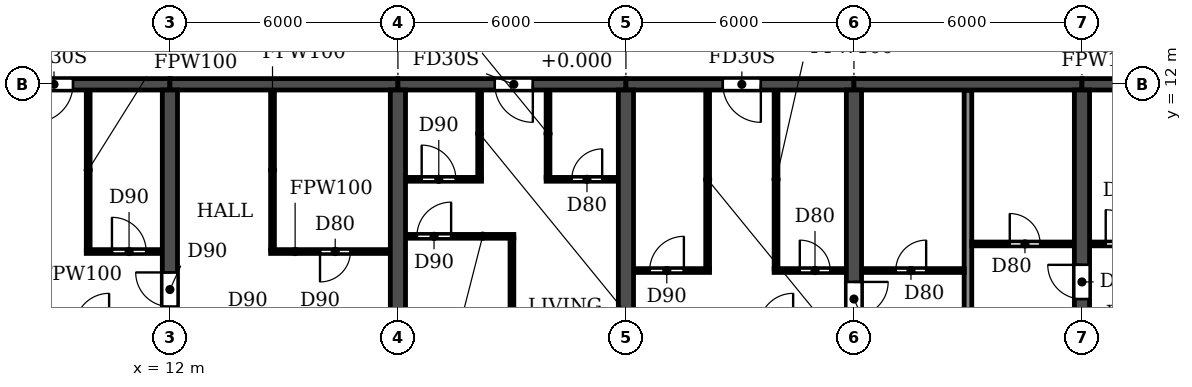
"""IFC4 building model, lengths in metres.
Left out: names, types, materials, properties, quantities, classifications, styles, units other than length and angle.
Written with IfcOpenShell. Run it as: python <this file> out.ifc"""

import sys

from ifc_helpers import new_model, si_unit, direction, frame, frame_2d, origin, place, context, subcontext, project, spatial, rectangle, extrude, element, fill, save


model = new_model("IFC4")
c1 = context("Model", 3, precision=1e-05, world=origin(), true_north=direction((0.0, 1.0)))
c2 = subcontext(c1, "Body", "Model", "MODEL_VIEW")
j1 = project(units=[si_unit("LENGTHUNIT", "METRE"), si_unit("PLANEANGLEUNIT", "RADIAN")], contexts=[c1])
p1 = place(None, origin())
s1 = spatial("IfcSite", under=j1, at=p1, CompositionType="ELEMENT")
p2 = place(p1, origin())
s2 = spatial("IfcBuilding", under=s1, at=p2, CompositionType="ELEMENT")
p3 = place(p2, frame((0.0, 0.0, 26.7)))
s3 = spatial("IfcBuildingStorey", under=s2, at=p3, CompositionType="ELEMENT", Elevation=26.7)
p4 = place(p3, frame((12.0, 0.2, 0.0), z_axis=(0.0, 0.0, 1.0), x_axis=(0.0, 1.0, 0.0)))
e1 = element("IfcWall", 1, at=p4, inside=s3, PredefinedType="SHEAR", context=c2, shape_type="SweptSolid", body=[
    extrude(rectangle(XDim=11.65, YDim=0.4, at=frame_2d((5.825, 0.0))), origin(), (0.0, 0.0, 1.0), 3.05),
])
p5 = place(p4, frame((5.95, 0.0, 0.0)))
e2 = element("IfcOpeningElement", 2, at=p5, cuts=e1, PredefinedType="OPENING", context=c2, shape_type="SweptSolid", body=[
    extrude(rectangle(XDim=0.9, YDim=2.1, at=frame_2d((0.45, 1.05))), frame((0.0, 0.21, 0.0), z_axis=(0.0, -1.0, 0.0), x_axis=(1.0, 0.0, 0.0)), (0.0, 0.0, 1.0), 0.42),
])
for number, where, z_axis, x_axis in (
    (3, (18.0, 0.2, 0.0), (0.0, 0.0, 1.0), (0.0, 1.0, 0.0)),
    (4, (24.0, 0.2, 0.0), (0.0, 0.0, 1.0), (0.0, 1.0, 0.0)),
):
    element("IfcWall", number, at=place(p3, frame(where, z_axis=z_axis, x_axis=x_axis)), inside=s3, PredefinedType="SHEAR", context=c2, shape_type="SweptSolid", body=[
        extrude(rectangle(XDim=11.65, YDim=0.4, at=frame_2d((5.825, 0.0))), origin(), (0.0, 0.0, 1.0), 3.05),
    ])
p6 = place(p3, frame((30.0, 0.2, 0.0), z_axis=(0.0, 0.0, 1.0), x_axis=(0.0, 1.0, 0.0)))
e5 = element("IfcWall", 5, at=p6, inside=s3, PredefinedType="SHEAR", context=c2, shape_type="SweptSolid", body=[
    extrude(rectangle(XDim=11.65, YDim=0.4, at=frame_2d((5.825, 0.0))), origin(), (0.0, 0.0, 1.0), 3.05),
])
p7 = place(p6, frame((5.7, 0.0, 0.0)))
e6 = element("IfcOpeningElement", 6, at=p7, cuts=e5, PredefinedType="OPENING", context=c2, shape_type="SweptSolid", body=[
    extrude(rectangle(XDim=0.9, YDim=2.1, at=frame_2d((0.45, 1.05))), frame((0.0, 0.21, 0.0), z_axis=(0.0, -1.0, 0.0), x_axis=(1.0, 0.0, 0.0)), (0.0, 0.0, 1.0), 0.42),
])
p8 = place(p3, frame((36.0, 0.2, 0.0), z_axis=(0.0, 0.0, 1.0), x_axis=(0.0, 1.0, 0.0)))
e7 = element("IfcWall", 7, at=p8, inside=s3, PredefinedType="SHEAR", context=c2, shape_type="SweptSolid", body=[
    extrude(rectangle(XDim=11.65, YDim=0.4, at=frame_2d((5.825, 0.0))), origin(), (0.0, 0.0, 1.0), 3.05),
])
p9 = place(p8, frame((6.15, 0.0, 0.0)))
e8 = element("IfcOpeningElement", 8, at=p9, cuts=e7, PredefinedType="OPENING", context=c2, shape_type="SweptSolid", body=[
    extrude(rectangle(XDim=0.9, YDim=2.1, at=frame_2d((0.45, 1.05))), frame((0.0, 0.21, 0.0), z_axis=(0.0, -1.0, 0.0), x_axis=(1.0, 0.0, 0.0)), (0.0, 0.0, 1.0), 0.42),
])
p10 = place(p3, frame((6.0, 12.0, 0.0), z_axis=(0.0, 0.0, 1.0), x_axis=(1.0, 0.0, 0.0)))
e9 = element("IfcWall", 9, at=p10, inside=s3, PredefinedType="SHEAR", context=c2, shape_type="SweptSolid", body=[
    extrude(rectangle(XDim=6.0, YDim=0.3, at=frame_2d((3.0, 0.0))), origin(), (0.0, 0.0, 1.0), 2.45),
])
p11 = place(p10, frame((2.45, 0.0, 0.0)))
e10 = element("IfcOpeningElement", 10, at=p11, cuts=e9, PredefinedType="OPENING", context=c2, shape_type="SweptSolid", body=[
    extrude(rectangle(XDim=1.0, YDim=2.1, at=frame_2d((0.5, 1.05))), frame((0.0, 0.16, 0.0), z_axis=(0.0, -1.0, 0.0), x_axis=(1.0, 0.0, 0.0)), (0.0, 0.0, 1.0), 0.32),
])
p12 = place(p3, frame((12.0, 12.0, 0.0), z_axis=(0.0, 0.0, 1.0), x_axis=(1.0, 0.0, 0.0)))
e11 = element("IfcWall", 11, at=p12, inside=s3, PredefinedType="SHEAR", context=c2, shape_type="SweptSolid", body=[
    extrude(rectangle(XDim=6.0, YDim=0.3, at=frame_2d((3.0, 0.0))), origin(), (0.0, 0.0, 1.0), 2.45),
])
p13 = place(p3, frame((18.0, 12.0, 0.0), z_axis=(0.0, 0.0, 1.0), x_axis=(1.0, 0.0, 0.0)))
e12 = element("IfcWall", 12, at=p13, inside=s3, PredefinedType="SHEAR", context=c2, shape_type="SweptSolid", body=[
    extrude(rectangle(XDim=6.0, YDim=0.3, at=frame_2d((3.0, 0.0))), origin(), (0.0, 0.0, 1.0), 2.45),
])
p14 = place(p13, frame((2.55, 0.0, 0.0)))
e13 = element("IfcOpeningElement", 13, at=p14, cuts=e12, PredefinedType="OPENING", context=c2, shape_type="SweptSolid", body=[
    extrude(rectangle(XDim=1.0, YDim=2.1, at=frame_2d((0.5, 1.05))), frame((0.0, 0.16, 0.0), z_axis=(0.0, -1.0, 0.0), x_axis=(1.0, 0.0, 0.0)), (0.0, 0.0, 1.0), 0.32),
])
p15 = place(p3, frame((24.0, 12.0, 0.0), z_axis=(0.0, 0.0, 1.0), x_axis=(1.0, 0.0, 0.0)))
e14 = element("IfcWall", 14, at=p15, inside=s3, PredefinedType="SHEAR", context=c2, shape_type="SweptSolid", body=[
    extrude(rectangle(XDim=6.0, YDim=0.3, at=frame_2d((3.0, 0.0))), origin(), (0.0, 0.0, 1.0), 2.45),
])
p16 = place(p15, frame((2.55, 0.0, 0.0)))
e15 = element("IfcOpeningElement", 15, at=p16, cuts=e14, PredefinedType="OPENING", context=c2, shape_type="SweptSolid", body=[
    extrude(rectangle(XDim=1.0, YDim=2.1, at=frame_2d((0.5, 1.05))), frame((0.0, 0.16, 0.0), z_axis=(0.0, -1.0, 0.0), x_axis=(1.0, 0.0, 0.0)), (0.0, 0.0, 1.0), 0.32),
])
p17 = place(p3, frame((30.0, 12.0, 0.0), z_axis=(0.0, 0.0, 1.0), x_axis=(1.0, 0.0, 0.0)))
e16 = element("IfcWall", 16, at=p17, inside=s3, PredefinedType="SHEAR", context=c2, shape_type="SweptSolid", body=[
    extrude(rectangle(XDim=6.0, YDim=0.3, at=frame_2d((3.0, 0.0))), origin(), (0.0, 0.0, 1.0), 2.45),
])
p18 = place(p3, frame((36.0, 12.0, 0.0), z_axis=(0.0, 0.0, 1.0), x_axis=(1.0, 0.0, 0.0)))
e17 = element("IfcWall", 17, at=p18, inside=s3, PredefinedType="SHEAR", context=c2, shape_type="SweptSolid", body=[
    extrude(rectangle(XDim=6.0, YDim=0.3, at=frame_2d((3.0, 0.0))), origin(), (0.0, 0.0, 1.0), 2.45),
])
p19 = place(p18, frame((2.55, 0.0, 0.0)))
e18 = element("IfcOpeningElement", 18, at=p19, cuts=e17, PredefinedType="OPENING", context=c2, shape_type="SweptSolid", body=[
    extrude(rectangle(XDim=1.0, YDim=2.1, at=frame_2d((0.5, 1.05))), frame((0.0, 0.16, 0.0), z_axis=(0.0, -1.0, 0.0), x_axis=(1.0, 0.0, 0.0)), (0.0, 0.0, 1.0), 0.32),
])
p20 = place(p3, frame((33.0, 0.06, 0.0), z_axis=(0.0, 0.0, 1.0), x_axis=(0.0, 1.0, 0.0)))
e19 = element("IfcWall", 19, at=p20, inside=s3, PredefinedType="PARTITIONING", context=c2, shape_type="SweptSolid", body=[
    extrude(rectangle(XDim=11.78, YDim=0.2, at=frame_2d((5.89, 0.0))), origin(), (0.0, 0.0, 1.0), 3.05),
])
p21 = place(p3, frame((24.21, 7.1, 0.0), z_axis=(0.0, 0.0, 1.0), x_axis=(1.0, 0.0, 0.0)))
e20 = element("IfcWall", 20, at=p21, inside=s3, PredefinedType="PARTITIONING", context=c2, shape_type="SweptSolid", body=[
    extrude(rectangle(XDim=1.99, YDim=0.1, at=frame_2d((0.995, 0.0))), origin(), (0.0, 0.0, 1.0), 3.05),
])
p22 = place(p21, frame((0.415, 0.0, 0.0)))
e21 = element("IfcOpeningElement", 21, at=p22, cuts=e20, PredefinedType="OPENING", context=c2, shape_type="SweptSolid", body=[
    extrude(rectangle(XDim=0.9, YDim=2.1, at=frame_2d((0.45, 1.05))), frame((0.0, 0.06, 0.0), z_axis=(0.0, -1.0, 0.0), x_axis=(1.0, 0.0, 0.0)), (0.0, 0.0, 1.0), 0.12),
])
p23 = place(p3, frame((27.9, 7.1, 0.0), z_axis=(0.0, 0.0, 1.0), x_axis=(1.0, 0.0, 0.0)))
e22 = element("IfcWall", 22, at=p23, inside=s3, PredefinedType="PARTITIONING", context=c2, shape_type="SweptSolid", body=[
    extrude(rectangle(XDim=1.89, YDim=0.1, at=frame_2d((0.945, 0.0))), origin(), (0.0, 0.0, 1.0), 3.05),
])
p24 = place(p23, frame((0.675, 0.0, 0.0)))
e23 = element("IfcOpeningElement", 23, at=p24, cuts=e22, PredefinedType="OPENING", context=c2, shape_type="SweptSolid", body=[
    extrude(rectangle(XDim=0.8, YDim=2.1, at=frame_2d((0.4, 1.05))), frame((0.0, 0.06, 0.0), z_axis=(0.0, -1.0, 0.0), x_axis=(1.0, 0.0, 0.0)), (0.0, 0.0, 1.0), 0.12),
])
p25 = place(p3, frame((30.21, 7.1, 0.0), z_axis=(0.0, 0.0, 1.0), x_axis=(1.0, 0.0, 0.0)))
e24 = element("IfcWall", 24, at=p25, inside=s3, PredefinedType="PARTITIONING", context=c2, shape_type="SweptSolid", body=[
    extrude(rectangle(XDim=2.69, YDim=0.1, at=frame_2d((1.345, 0.0))), origin(), (0.0, 0.0, 1.0), 3.05),
])
p26 = place(p25, frame((0.89, 0.0, 0.0)))
e25 = element("IfcOpeningElement", 25, at=p26, cuts=e24, PredefinedType="OPENING", context=c2, shape_type="SweptSolid", body=[
    extrude(rectangle(XDim=0.8, YDim=2.1, at=frame_2d((0.4, 1.05))), frame((0.0, 0.06, 0.0), z_axis=(0.0, -1.0, 0.0), x_axis=(1.0, 0.0, 0.0)), (0.0, 0.0, 1.0), 0.12),
])
p27 = place(p3, frame((9.8, 7.6, 0.0), z_axis=(0.0, 0.0, 1.0), x_axis=(1.0, 0.0, 0.0)))
e26 = element("IfcWall", 26, at=p27, inside=s3, PredefinedType="PARTITIONING", context=c2, shape_type="SweptSolid", body=[
    extrude(rectangle(XDim=1.99, YDim=0.1, at=frame_2d((0.995, 0.0))), origin(), (0.0, 0.0, 1.0), 3.05),
])
p28 = place(p27, frame((0.675, 0.0, 0.0)))
e27 = element("IfcOpeningElement", 27, at=p28, cuts=e26, PredefinedType="OPENING", context=c2, shape_type="SweptSolid", body=[
    extrude(rectangle(XDim=0.9, YDim=2.1, at=frame_2d((0.45, 1.05))), frame((0.0, 0.06, 0.0), z_axis=(0.0, -1.0, 0.0), x_axis=(1.0, 0.0, 0.0)), (0.0, 0.0, 1.0), 0.12),
])
p29 = place(p3, frame((14.65, 7.6, 0.0), z_axis=(0.0, 0.0, 1.0), x_axis=(1.0, 0.0, 0.0)))
e28 = element("IfcWall", 28, at=p29, inside=s3, PredefinedType="PARTITIONING", context=c2, shape_type="SweptSolid", body=[
    extrude(rectangle(XDim=3.14, YDim=0.1, at=frame_2d((1.57, 0.0))), origin(), (0.0, 0.0, 1.0), 3.05),
])
p30 = place(p29, frame((1.3, 0.0, 0.0)))
e29 = element("IfcOpeningElement", 29, at=p30, cuts=e28, PredefinedType="OPENING", context=c2, shape_type="SweptSolid", body=[
    extrude(rectangle(XDim=0.8, YDim=2.1, at=frame_2d((0.4, 1.05))), frame((0.0, 0.06, 0.0), z_axis=(0.0, -1.0, 0.0), x_axis=(1.0, 0.0, 0.0)), (0.0, 0.0, 1.0), 0.12),
])
p31 = place(p3, frame((33.1, 7.8, 0.0), z_axis=(0.0, 0.0, 1.0), x_axis=(1.0, 0.0, 0.0)))
e30 = element("IfcWall", 30, at=p31, inside=s3, PredefinedType="PARTITIONING", context=c2, shape_type="SweptSolid", body=[
    extrude(rectangle(XDim=2.69, YDim=0.1, at=frame_2d((1.345, 0.0))), origin(), (0.0, 0.0, 1.0), 3.05),
])
p32 = place(p31, frame((1.0, 0.0, 0.0)))
e31 = element("IfcOpeningElement", 31, at=p32, cuts=e30, PredefinedType="OPENING", context=c2, shape_type="SweptSolid", body=[
    extrude(rectangle(XDim=0.8, YDim=2.1, at=frame_2d((0.4, 1.05))), frame((0.0, 0.06, 0.0), z_axis=(0.0, -1.0, 0.0), x_axis=(1.0, 0.0, 0.0)), (0.0, 0.0, 1.0), 0.12),
])
p33 = place(p3, frame((36.21, 7.8, 0.0), z_axis=(0.0, 0.0, 1.0), x_axis=(1.0, 0.0, 0.0)))
e32 = element("IfcWall", 32, at=p33, inside=s3, PredefinedType="PARTITIONING", context=c2, shape_type="SweptSolid", body=[
    extrude(rectangle(XDim=1.99, YDim=0.1, at=frame_2d((0.995, 0.0))), origin(), (0.0, 0.0, 1.0), 3.05),
])
p34 = place(p33, frame((0.415, 0.0, 0.0)))
e33 = element("IfcOpeningElement", 33, at=p34, cuts=e32, PredefinedType="OPENING", context=c2, shape_type="SweptSolid", body=[
    extrude(rectangle(XDim=0.9, YDim=2.1, at=frame_2d((0.45, 1.05))), frame((0.0, 0.06, 0.0), z_axis=(0.0, -1.0, 0.0), x_axis=(1.0, 0.0, 0.0)), (0.0, 0.0, 1.0), 0.12),
])
p35 = place(p3, frame((18.21, 8.0, 0.0), z_axis=(0.0, 0.0, 1.0), x_axis=(1.0, 0.0, 0.0)))
e34 = element("IfcWall", 34, at=p35, inside=s3, PredefinedType="PARTITIONING", context=c2, shape_type="SweptSolid", body=[
    extrude(rectangle(XDim=2.84, YDim=0.1, at=frame_2d((1.42, 0.0))), origin(), (0.0, 0.0, 1.0), 3.05),
])
p36 = place(p35, frame((0.29, 0.0, 0.0)))
e35 = element("IfcOpeningElement", 35, at=p36, cuts=e34, PredefinedType="OPENING", context=c2, shape_type="SweptSolid", body=[
    extrude(rectangle(XDim=0.9, YDim=2.1, at=frame_2d((0.45, 1.05))), frame((0.0, 0.06, 0.0), z_axis=(0.0, -1.0, 0.0), x_axis=(1.0, 0.0, 0.0)), (0.0, 0.0, 1.0), 0.12),
])
p37 = place(p3, frame((18.21, 9.5, 0.0), z_axis=(0.0, 0.0, 1.0), x_axis=(1.0, 0.0, 0.0)))
e36 = element("IfcWall", 36, at=p37, inside=s3, PredefinedType="PARTITIONING", context=c2, shape_type="SweptSolid", body=[
    extrude(rectangle(XDim=1.99, YDim=0.1, at=frame_2d((0.995, 0.0))), origin(), (0.0, 0.0, 1.0), 3.05),
])
p38 = place(p37, frame((0.415, 0.0, 0.0)))
e37 = element("IfcOpeningElement", 37, at=p38, cuts=e36, PredefinedType="OPENING", context=c2, shape_type="SweptSolid", body=[
    extrude(rectangle(XDim=0.9, YDim=2.1, at=frame_2d((0.45, 1.05))), frame((0.0, 0.06, 0.0), z_axis=(0.0, -1.0, 0.0), x_axis=(1.0, 0.0, 0.0)), (0.0, 0.0, 1.0), 0.12),
])
p39 = place(p3, frame((21.9, 9.5, 0.0), z_axis=(0.0, 0.0, 1.0), x_axis=(1.0, 0.0, 0.0)))
e38 = element("IfcWall", 38, at=p39, inside=s3, PredefinedType="PARTITIONING", context=c2, shape_type="SweptSolid", body=[
    extrude(rectangle(XDim=1.89, YDim=0.1, at=frame_2d((0.945, 0.0))), origin(), (0.0, 0.0, 1.0), 3.05),
])
p40 = place(p39, frame((0.675, 0.0, 0.0)))
e39 = element("IfcOpeningElement", 39, at=p40, cuts=e38, PredefinedType="OPENING", context=c2, shape_type="SweptSolid", body=[
    extrude(rectangle(XDim=0.8, YDim=2.1, at=frame_2d((0.4, 1.05))), frame((0.0, 0.06, 0.0), z_axis=(0.0, -1.0, 0.0), x_axis=(1.0, 0.0, 0.0)), (0.0, 0.0, 1.0), 0.12),
])
for number, where, z_axis, x_axis in (
    (40, (9.85, 7.65, 0.0), (0.0, 0.0, 1.0), (0.0, 1.0, 0.0)),
    (41, (14.7, 7.65, 0.0), (0.0, 0.0, 1.0), (0.0, 1.0, 0.0)),
):
    element("IfcWall", number, at=place(p3, frame(where, z_axis=z_axis, x_axis=x_axis)), inside=s3, PredefinedType="PARTITIONING", context=c2, shape_type="SweptSolid", body=[
        extrude(rectangle(XDim=4.19, YDim=0.1, at=frame_2d((2.095, 0.0))), origin(), (0.0, 0.0, 1.0), 3.05),
    ])
p41 = place(p3, frame((20.15, 9.55, 0.0), z_axis=(0.0, 0.0, 1.0), x_axis=(0.0, 1.0, 0.0)))
e42 = element("IfcWall", 42, at=p41, inside=s3, PredefinedType="PARTITIONING", context=c2, shape_type="SweptSolid", body=[
    extrude(rectangle(XDim=2.29, YDim=0.1, at=frame_2d((1.145, 0.0))), origin(), (0.0, 0.0, 1.0), 3.05),
])
p42 = place(p3, frame((21.0, 0.06, 0.0), z_axis=(0.0, 0.0, 1.0), x_axis=(0.0, 1.0, 0.0)))
e43 = element("IfcWall", 43, at=p42, inside=s3, PredefinedType="PARTITIONING", context=c2, shape_type="SweptSolid", body=[
    extrude(rectangle(XDim=7.89, YDim=0.1, at=frame_2d((3.945, 0.0))), origin(), (0.0, 0.0, 1.0), 3.05),
])
p43 = place(p3, frame((21.95, 9.55, 0.0), z_axis=(0.0, 0.0, 1.0), x_axis=(0.0, 1.0, 0.0)))
e44 = element("IfcWall", 44, at=p43, inside=s3, PredefinedType="PARTITIONING", context=c2, shape_type="SweptSolid", body=[
    extrude(rectangle(XDim=2.29, YDim=0.1, at=frame_2d((1.145, 0.0))), origin(), (0.0, 0.0, 1.0), 3.05),
])
for number, where, z_axis, x_axis in (
    (45, (26.15, 7.15, 0.0), (0.0, 0.0, 1.0), (0.0, 1.0, 0.0)),
    (46, (27.95, 7.15, 0.0), (0.0, 0.0, 1.0), (0.0, 1.0, 0.0)),
):
    element("IfcWall", number, at=place(p3, frame(where, z_axis=z_axis, x_axis=x_axis)), inside=s3, PredefinedType="PARTITIONING", context=c2, shape_type="SweptSolid", body=[
        extrude(rectangle(XDim=4.69, YDim=0.1, at=frame_2d((2.345, 0.0))), origin(), (0.0, 0.0, 1.0), 3.05),
    ])
p44 = place(p30, frame((0.8, 0.0, 0.0), z_axis=(0.0, 0.0, 1.0), x_axis=(-1.0, 0.0, 0.0)))
e47 = element("IfcDoor", 47, at=p44, inside=s3, OperationType="SINGLE_SWING_RIGHT", PredefinedType="DOOR", context=c2, shape_type="SweptSolid", body=[
    extrude(rectangle(XDim=0.8, YDim=2.1, at=frame_2d((0.4, 1.05))), frame((0.0, 0.025, 0.0), z_axis=(0.0, -1.0, 0.0), x_axis=(1.0, 0.0, 0.0)), (0.0, 0.0, 1.0), 0.05),
])
fill(e29, e47)
p45 = place(p11, frame((1.0, 0.0, 0.0), z_axis=(0.0, 0.0, 1.0), x_axis=(-1.0, 0.0, 0.0)))
e48 = element("IfcDoor", 48, at=p45, inside=s3, OperationType="SINGLE_SWING_RIGHT", PredefinedType="DOOR", context=c2, shape_type="SweptSolid", body=[
    extrude(rectangle(XDim=1.0, YDim=2.1, at=frame_2d((0.5, 1.05))), frame((0.0, 0.025, 0.0), z_axis=(0.0, -1.0, 0.0), x_axis=(1.0, 0.0, 0.0)), (0.0, 0.0, 1.0), 0.05),
])
fill(e10, e48)
p46 = place(p28, origin())
e49 = element("IfcDoor", 49, at=p46, inside=s3, OperationType="SINGLE_SWING_LEFT", PredefinedType="DOOR", context=c2, shape_type="SweptSolid", body=[
    extrude(rectangle(XDim=0.9, YDim=2.1, at=frame_2d((0.45, 1.05))), frame((0.0, 0.025, 0.0), z_axis=(0.0, -1.0, 0.0), x_axis=(1.0, 0.0, 0.0)), (0.0, 0.0, 1.0), 0.05),
])
fill(e27, e49)
p47 = place(p5, origin())
e50 = element("IfcDoor", 50, at=p47, inside=s3, OperationType="SINGLE_SWING_RIGHT", PredefinedType="DOOR", context=c2, shape_type="SweptSolid", body=[
    extrude(rectangle(XDim=0.9, YDim=2.1, at=frame_2d((0.45, 1.05))), frame((0.0, 0.025, 0.0), z_axis=(0.0, -1.0, 0.0), x_axis=(1.0, 0.0, 0.0)), (0.0, 0.0, 1.0), 0.05),
])
fill(e2, e50)
p48 = place(p36, origin())
e51 = element("IfcDoor", 51, at=p48, inside=s3, OperationType="SINGLE_SWING_RIGHT", PredefinedType="DOOR", context=c2, shape_type="SweptSolid", body=[
    extrude(rectangle(XDim=0.9, YDim=2.1, at=frame_2d((0.45, 1.05))), frame((0.0, 0.025, 0.0), z_axis=(0.0, -1.0, 0.0), x_axis=(1.0, 0.0, 0.0)), (0.0, 0.0, 1.0), 0.05),
])
fill(e35, e51)
p49 = place(p38, origin())
e52 = element("IfcDoor", 52, at=p49, inside=s3, OperationType="SINGLE_SWING_LEFT", PredefinedType="DOOR", context=c2, shape_type="SweptSolid", body=[
    extrude(rectangle(XDim=0.9, YDim=2.1, at=frame_2d((0.45, 1.05))), frame((0.0, 0.025, 0.0), z_axis=(0.0, -1.0, 0.0), x_axis=(1.0, 0.0, 0.0)), (0.0, 0.0, 1.0), 0.05),
])
fill(e37, e52)
p50 = place(p14, frame((1.0, 0.0, 0.0), z_axis=(0.0, 0.0, 1.0), x_axis=(-1.0, 0.0, 0.0)))
e53 = element("IfcDoor", 53, at=p50, inside=s3, OperationType="SINGLE_SWING_LEFT", PredefinedType="DOOR", context=c2, shape_type="SweptSolid", body=[
    extrude(rectangle(XDim=1.0, YDim=2.1, at=frame_2d((0.5, 1.05))), frame((0.0, 0.025, 0.0), z_axis=(0.0, -1.0, 0.0), x_axis=(1.0, 0.0, 0.0)), (0.0, 0.0, 1.0), 0.05),
])
fill(e13, e53)
p51 = place(p40, origin())
e54 = element("IfcDoor", 54, at=p51, inside=s3, OperationType="SINGLE_SWING_RIGHT", PredefinedType="DOOR", context=c2, shape_type="SweptSolid", body=[
    extrude(rectangle(XDim=0.8, YDim=2.1, at=frame_2d((0.4, 1.05))), frame((0.0, 0.025, 0.0), z_axis=(0.0, -1.0, 0.0), x_axis=(1.0, 0.0, 0.0)), (0.0, 0.0, 1.0), 0.05),
])
fill(e39, e54)
p52 = place(p26, origin())
e55 = element("IfcDoor", 55, at=p52, inside=s3, OperationType="SINGLE_SWING_RIGHT", PredefinedType="DOOR", context=c2, shape_type="SweptSolid", body=[
    extrude(rectangle(XDim=0.8, YDim=2.1, at=frame_2d((0.4, 1.05))), frame((0.0, 0.025, 0.0), z_axis=(0.0, -1.0, 0.0), x_axis=(1.0, 0.0, 0.0)), (0.0, 0.0, 1.0), 0.05),
])
fill(e25, e55)
p53 = place(p22, origin())
e56 = element("IfcDoor", 56, at=p53, inside=s3, OperationType="SINGLE_SWING_RIGHT", PredefinedType="DOOR", context=c2, shape_type="SweptSolid", body=[
    extrude(rectangle(XDim=0.9, YDim=2.1, at=frame_2d((0.45, 1.05))), frame((0.0, 0.025, 0.0), z_axis=(0.0, -1.0, 0.0), x_axis=(1.0, 0.0, 0.0)), (0.0, 0.0, 1.0), 0.05),
])
fill(e21, e56)
p54 = place(p16, frame((1.0, 0.0, 0.0), z_axis=(0.0, 0.0, 1.0), x_axis=(-1.0, 0.0, 0.0)))
e57 = element("IfcDoor", 57, at=p54, inside=s3, OperationType="SINGLE_SWING_LEFT", PredefinedType="DOOR", context=c2, shape_type="SweptSolid", body=[
    extrude(rectangle(XDim=1.0, YDim=2.1, at=frame_2d((0.5, 1.05))), frame((0.0, 0.025, 0.0), z_axis=(0.0, -1.0, 0.0), x_axis=(1.0, 0.0, 0.0)), (0.0, 0.0, 1.0), 0.05),
])
fill(e15, e57)
p55 = place(p24, origin())
e58 = element("IfcDoor", 58, at=p55, inside=s3, OperationType="SINGLE_SWING_LEFT", PredefinedType="DOOR", context=c2, shape_type="SweptSolid", body=[
    extrude(rectangle(XDim=0.8, YDim=2.1, at=frame_2d((0.4, 1.05))), frame((0.0, 0.025, 0.0), z_axis=(0.0, -1.0, 0.0), x_axis=(1.0, 0.0, 0.0)), (0.0, 0.0, 1.0), 0.05),
])
fill(e23, e58)
p56 = place(p7, frame((0.9, 0.0, 0.0), z_axis=(0.0, 0.0, 1.0), x_axis=(-1.0, 0.0, 0.0)))
e59 = element("IfcDoor", 59, at=p56, inside=s3, OperationType="SINGLE_SWING_LEFT", PredefinedType="DOOR", context=c2, shape_type="SweptSolid", body=[
    extrude(rectangle(XDim=0.9, YDim=2.1, at=frame_2d((0.45, 1.05))), frame((0.0, 0.025, 0.0), z_axis=(0.0, -1.0, 0.0), x_axis=(1.0, 0.0, 0.0)), (0.0, 0.0, 1.0), 0.05),
])
fill(e6, e59)
p57 = place(p32, origin())
e60 = element("IfcDoor", 60, at=p57, inside=s3, OperationType="SINGLE_SWING_LEFT", PredefinedType="DOOR", context=c2, shape_type="SweptSolid", body=[
    extrude(rectangle(XDim=0.8, YDim=2.1, at=frame_2d((0.4, 1.05))), frame((0.0, 0.025, 0.0), z_axis=(0.0, -1.0, 0.0), x_axis=(1.0, 0.0, 0.0)), (0.0, 0.0, 1.0), 0.05),
])
fill(e31, e60)
p58 = place(p9, origin())
e61 = element("IfcDoor", 61, at=p58, inside=s3, OperationType="SINGLE_SWING_RIGHT", PredefinedType="DOOR", context=c2, shape_type="SweptSolid", body=[
    extrude(rectangle(XDim=0.9, YDim=2.1, at=frame_2d((0.45, 1.05))), frame((0.0, 0.025, 0.0), z_axis=(0.0, -1.0, 0.0), x_axis=(1.0, 0.0, 0.0)), (0.0, 0.0, 1.0), 0.05),
])
fill(e8, e61)
p59 = place(p34, origin())
e62 = element("IfcDoor", 62, at=p59, inside=s3, OperationType="SINGLE_SWING_LEFT", PredefinedType="DOOR", context=c2, shape_type="SweptSolid", body=[
    extrude(rectangle(XDim=0.9, YDim=2.1, at=frame_2d((0.45, 1.05))), frame((0.0, 0.025, 0.0), z_axis=(0.0, -1.0, 0.0), x_axis=(1.0, 0.0, 0.0)), (0.0, 0.0, 1.0), 0.05),
])
fill(e33, e62)
save(model, sys.argv[1])
